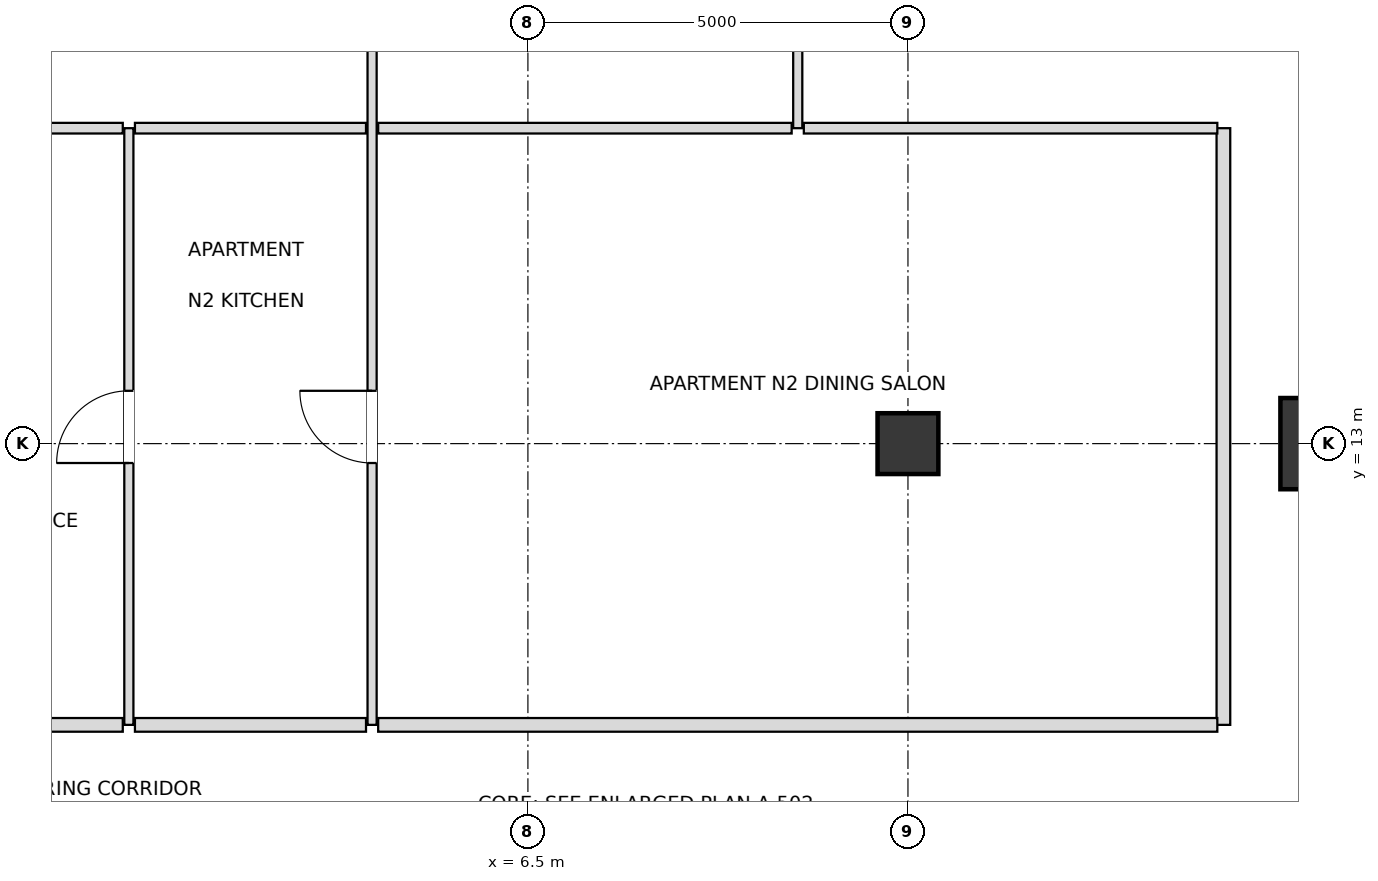
"""IFC4 building model, lengths in metres.
Left out: names, types, materials, properties, quantities, classifications, styles, units other than length and angle.
Written with IfcOpenShell. Run it as: python <this file> out.ifc"""

import sys

from ifc_helpers import new_model, si_unit, direction, frame, frame_2d, origin, origin_2d, place, context, subcontext, project, spatial, rectangle, extrude, element, fill, save


model = new_model("IFC4")
c1 = context("Model", 3, precision=1e-05, world=origin(), true_north=direction((0.0, 1.0)))
c2 = subcontext(c1, "Body", "Model", "MODEL_VIEW")
j1 = project(units=[si_unit("LENGTHUNIT", "METRE"), si_unit("PLANEANGLEUNIT", "RADIAN")], contexts=[c1])
p1 = place(None, origin())
s1 = spatial("IfcSite", under=j1, at=p1, CompositionType="ELEMENT")
p2 = place(p1, origin())
s2 = spatial("IfcBuilding", under=s1, at=p2, CompositionType="ELEMENT")
p3 = place(p2, frame((0.0, 0.0, 117.0)))
s3 = spatial("IfcBuildingStorey", under=s2, at=p3, CompositionType="ELEMENT", Elevation=117.0)
p4 = place(p3, frame((17.0, 13.0, 0.0), z_axis=(0.0, 0.0, 1.0), x_axis=(1.0, 0.0, 0.0)))
e1 = element("IfcColumn", 1, at=p4, inside=s3, PredefinedType="USERDEFINED", context=c2, shape_type="SweptSolid", body=[
    extrude(rectangle(XDim=1.2, YDim=1.2, at=origin_2d()), origin(), (0.0, 0.0, 1.0), 3.6),
])
p5 = place(p3, frame((11.5, 13.0, 0.0), z_axis=(0.0, 0.0, 1.0), x_axis=(1.0, 0.0, 0.0)))
e2 = element("IfcColumn", 2, at=p5, inside=s3, PredefinedType="COLUMN", context=c2, shape_type="SweptSolid", body=[
    extrude(rectangle(XDim=0.8, YDim=0.8, at=origin_2d()), origin(), (0.0, 0.0, 1.0), 3.6),
])
p6 = place(p3, frame((1.25, 9.3, 0.0), z_axis=(0.0, 0.0, 1.0), x_axis=(0.0, 1.0, 0.0)))
e3 = element("IfcWall", 3, at=p6, inside=s3, PredefinedType="PARTITIONING", context=c2, shape_type="SweptSolid", body=[
    extrude(rectangle(XDim=7.85, YDim=0.12, at=frame_2d((3.925, 0.0))), origin(), (0.0, 0.0, 1.0), 3.3),
])
p7 = place(p6, frame((3.445, 0.0, 0.0)))
e4 = element("IfcOpeningElement", 4, at=p7, cuts=e3, PredefinedType="OPENING", context=c2, shape_type="SweptSolid", body=[
    extrude(rectangle(XDim=0.95, YDim=2.1, at=frame_2d((0.475, 1.05))), frame((0.0, 0.07, 0.0), z_axis=(0.0, -1.0, 0.0), x_axis=(1.0, 0.0, 0.0)), (0.0, 0.0, 1.0), 0.14),
])
p8 = place(p3, frame((4.45, 9.3, 0.0), z_axis=(0.0, 0.0, 1.0), x_axis=(0.0, 1.0, 0.0)))
e5 = element("IfcWall", 5, at=p8, inside=s3, PredefinedType="PARTITIONING", context=c2, shape_type="SweptSolid", body=[
    extrude(rectangle(XDim=13.85, YDim=0.12, at=frame_2d((6.925, 0.0))), origin(), (0.0, 0.0, 1.0), 2.736),
])
p9 = place(p8, frame((3.445, 0.0, 0.0)))
e6 = element("IfcOpeningElement", 6, at=p9, cuts=e5, PredefinedType="OPENING", context=c2, shape_type="SweptSolid", body=[
    extrude(rectangle(XDim=0.95, YDim=2.1, at=frame_2d((0.475, 1.05))), frame((0.0, 0.07, 0.0), z_axis=(0.0, -1.0, 0.0), x_axis=(1.0, 0.0, 0.0)), (0.0, 0.0, 1.0), 0.14),
])
p10 = place(p8, frame((10.4, 0.0, 0.0)))
e7 = element("IfcOpeningElement", 7, at=p10, cuts=e5, PredefinedType="OPENING", context=c2, shape_type="SweptSolid", body=[
    extrude(rectangle(XDim=0.9, YDim=2.1, at=frame_2d((0.45, 1.05))), frame((0.0, 0.07, 0.0), z_axis=(0.0, -1.0, 0.0), x_axis=(1.0, 0.0, 0.0)), (0.0, 0.0, 1.0), 0.14),
])
p11 = place(p3, frame((10.05, 17.15, 0.0), z_axis=(0.0, 0.0, 1.0), x_axis=(0.0, 1.0, 0.0)))
e8 = element("IfcWall", 8, at=p11, inside=s3, PredefinedType="PARTITIONING", context=c2, shape_type="SweptSolid", body=[
    extrude(rectangle(XDim=6.0, YDim=0.12, at=frame_2d((3.0, 0.0))), origin(), (0.0, 0.0, 1.0), 2.736),
])
p12 = place(p11, frame((3.701, 0.0, 0.0)))
e9 = element("IfcOpeningElement", 9, at=p12, cuts=e8, PredefinedType="OPENING", context=c2, shape_type="SweptSolid", body=[
    extrude(rectangle(XDim=0.9, YDim=2.1, at=frame_2d((0.45, 1.05))), frame((0.0, 0.07, 0.0), z_axis=(0.0, -1.0, 0.0), x_axis=(1.0, 0.0, 0.0)), (0.0, 0.0, 1.0), 0.14),
])
p13 = place(p3, frame((15.65, 9.3, 0.0), z_axis=(0.0, 0.0, 1.0), x_axis=(0.0, 1.0, 0.0)))
e10 = element("IfcWall", 10, at=p13, inside=s3, PredefinedType="PARTITIONING", context=c2, shape_type="SweptSolid", body=[
    extrude(rectangle(XDim=7.85, YDim=0.18, at=frame_2d((3.925, 0.0))), origin(), (0.0, 0.0, 1.0), 2.656),
])
p14 = place(p3, frame((-2.87, 9.3, 0.0), z_axis=(0.0, 0.0, 1.0), x_axis=(1.0, 0.0, 0.0)))
e11 = element("IfcWall", 11, at=p14, inside=s3, PredefinedType="PARTITIONING", context=c2, shape_type="SweptSolid", body=[
    extrude(rectangle(XDim=4.04, YDim=0.18, at=frame_2d((2.02, 0.0))), origin(), (0.0, 0.0, 1.0), 3.3),
])
p15 = place(p14, frame((1.545, 0.0, 0.0)))
e12 = element("IfcOpeningElement", 12, at=p15, cuts=e11, PredefinedType="OPENING", context=c2, shape_type="SweptSolid", body=[
    extrude(rectangle(XDim=0.95, YDim=2.15, at=frame_2d((0.475, 1.075))), frame((0.0, 0.1, 0.0), z_axis=(0.0, -1.0, 0.0), x_axis=(1.0, 0.0, 0.0)), (0.0, 0.0, 1.0), 0.2),
])
p16 = place(p3, frame((1.33, 9.3, 0.0), z_axis=(0.0, 0.0, 1.0), x_axis=(1.0, 0.0, 0.0)))
e13 = element("IfcWall", 13, at=p16, inside=s3, PredefinedType="PARTITIONING", context=c2, shape_type="SweptSolid", body=[
    extrude(rectangle(XDim=3.04, YDim=0.18, at=frame_2d((1.52, 0.0))), origin(), (0.0, 0.0, 1.0), 3.3),
])
p17 = place(p3, frame((4.53, 9.3, 0.0), z_axis=(0.0, 0.0, 1.0), x_axis=(1.0, 0.0, 0.0)))
e14 = element("IfcWall", 14, at=p17, inside=s3, PredefinedType="PARTITIONING", context=c2, shape_type="SweptSolid", body=[
    extrude(rectangle(XDim=11.04, YDim=0.18, at=frame_2d((5.52, 0.0))), origin(), (0.0, 0.0, 1.0), 2.736),
])
p18 = place(p3, frame((-2.87, 17.15, 0.0), z_axis=(0.0, 0.0, 1.0), x_axis=(1.0, 0.0, 0.0)))
e15 = element("IfcWall", 15, at=p18, inside=s3, PredefinedType="PARTITIONING", context=c2, shape_type="SweptSolid", body=[
    extrude(rectangle(XDim=4.04, YDim=0.14, at=frame_2d((2.02, 0.0))), origin(), (0.0, 0.0, 1.0), 3.3),
])
p19 = place(p18, frame((1.545, 0.0, 0.0)))
e16 = element("IfcOpeningElement", 16, at=p19, cuts=e15, PredefinedType="OPENING", context=c2, shape_type="SweptSolid", body=[
    extrude(rectangle(XDim=0.95, YDim=2.1, at=frame_2d((0.475, 1.05))), frame((0.0, 0.08, 0.0), z_axis=(0.0, -1.0, 0.0), x_axis=(1.0, 0.0, 0.0)), (0.0, 0.0, 1.0), 0.16),
])
p20 = place(p3, frame((1.33, 17.15, 0.0), z_axis=(0.0, 0.0, 1.0), x_axis=(1.0, 0.0, 0.0)))
e17 = element("IfcWall", 17, at=p20, inside=s3, PredefinedType="PARTITIONING", context=c2, shape_type="SweptSolid", body=[
    extrude(rectangle(XDim=3.04, YDim=0.14, at=frame_2d((1.52, 0.0))), origin(), (0.0, 0.0, 1.0), 3.3),
])
p21 = place(p3, frame((4.53, 17.15, 0.0), z_axis=(0.0, 0.0, 1.0), x_axis=(1.0, 0.0, 0.0)))
e18 = element("IfcWall", 18, at=p21, inside=s3, PredefinedType="PARTITIONING", context=c2, shape_type="SweptSolid", body=[
    extrude(rectangle(XDim=5.44, YDim=0.14, at=frame_2d((2.72, 0.0))), origin(), (0.0, 0.0, 1.0), 2.736),
])
p22 = place(p3, frame((10.13, 17.15, 0.0), z_axis=(0.0, 0.0, 1.0), x_axis=(1.0, 0.0, 0.0)))
e19 = element("IfcWall", 19, at=p22, inside=s3, PredefinedType="PARTITIONING", context=c2, shape_type="SweptSolid", body=[
    extrude(rectangle(XDim=5.44, YDim=0.14, at=frame_2d((2.72, 0.0))), origin(), (0.0, 0.0, 1.0), 2.656),
])
p23 = place(p7, origin())
e20 = element("IfcDoor", 20, at=p23, inside=s3, OperationType="SINGLE_SWING_LEFT", PredefinedType="DOOR", context=c2, shape_type="SweptSolid", body=[
    extrude(rectangle(XDim=0.95, YDim=2.1, at=frame_2d((0.475, 1.05))), frame((0.0, 0.025, 0.0), z_axis=(0.0, -1.0, 0.0), x_axis=(1.0, 0.0, 0.0)), (0.0, 0.0, 1.0), 0.05),
])
fill(e4, e20)
p24 = place(p9, origin())
e21 = element("IfcDoor", 21, at=p24, inside=s3, OperationType="SINGLE_SWING_RIGHT", PredefinedType="DOOR", context=c2, shape_type="SweptSolid", body=[
    extrude(rectangle(XDim=0.95, YDim=2.1, at=frame_2d((0.475, 1.05))), frame((0.0, 0.025, 0.0), z_axis=(0.0, -1.0, 0.0), x_axis=(1.0, 0.0, 0.0)), (0.0, 0.0, 1.0), 0.05),
])
fill(e6, e21)
save(model, sys.argv[1])
